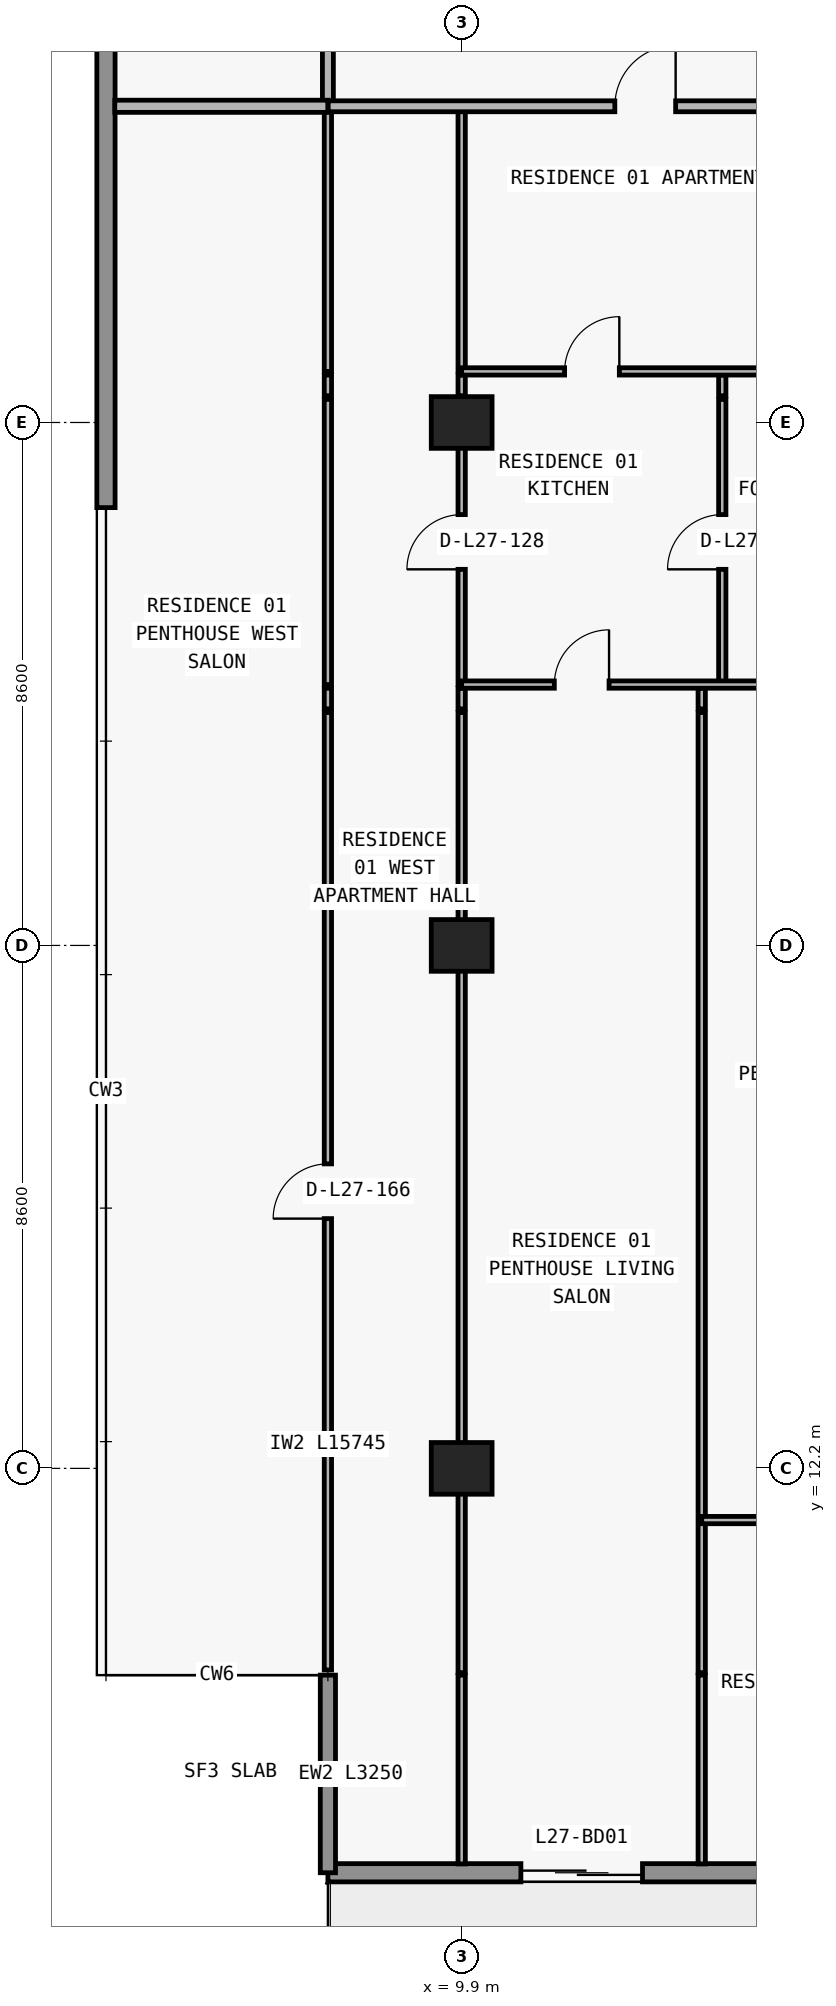
"""IFC4 building model, lengths in metres.
Left out: names, types, materials, properties, quantities, classifications, styles, units other than length and angle.
Written with IfcOpenShell. Run it as: python <this file> out.ifc"""

import sys

from ifc_helpers import new_model, si_unit, direction, frame, frame_2d, origin, origin_2d, place, context, subcontext, project, spatial, rectangle, extrude, element, fill, save


model = new_model("IFC4")
c1 = context("Model", 3, precision=1e-05, world=origin(), true_north=direction((0.0, 1.0)))
c2 = subcontext(c1, "Body", "Model", "MODEL_VIEW")
j1 = project(units=[si_unit("LENGTHUNIT", "METRE"), si_unit("PLANEANGLEUNIT", "RADIAN")], contexts=[c1])
p1 = place(None, origin())
s1 = spatial("IfcSite", under=j1, at=p1, CompositionType="ELEMENT")
p2 = place(p1, origin())
s2 = spatial("IfcBuilding", under=s1, at=p2, CompositionType="ELEMENT")
p3 = place(p2, frame((0.0, 0.0, 102.6)))
s3 = spatial("IfcBuildingStorey", under=s2, at=p3, CompositionType="ELEMENT", Elevation=102.6)
for number, where, z_axis, x_axis in (
    (1, (9.9, 12.2, 0.0), (0.0, 0.0, 1.0), (1.0, 0.0, 0.0)),
    (2, (9.9, 20.8, 0.0), (0.0, 0.0, 1.0), (1.0, 0.0, 0.0)),
    (3, (9.9, 29.4, 0.0), (0.0, 0.0, 1.0), (1.0, 0.0, 0.0)),
):
    element("IfcColumn", number, at=place(p3, frame(where, z_axis=z_axis, x_axis=x_axis)), inside=s3, PredefinedType="COLUMN", context=c2, shape_type="SweptSolid", body=[
        extrude(rectangle(XDim=1.0, YDim=0.85, at=origin_2d()), origin(), (0.0, 0.0, 1.0), 3.05),
    ])
p4 = place(p3, frame((70.1, 5.55, 0.0), z_axis=(0.0, 0.0, 1.0), x_axis=(-1.0, 0.0, 0.0)))
e4 = element("IfcWall", 4, at=p4, inside=s3, PredefinedType="STANDARD", context=c2, shape_type="SweptSolid", body=[
    extrude(rectangle(XDim=62.4, YDim=0.3, at=frame_2d((31.2, 0.0))), origin(), (0.0, 0.0, 1.0), 3.05),
])
p5 = place(p4, frame((57.226, 0.0, 0.0)))
e5 = element("IfcOpeningElement", 5, at=p5, cuts=e4, PredefinedType="OPENING", context=c2, shape_type="SweptSolid", body=[
    extrude(rectangle(XDim=2.0, YDim=2.3, at=frame_2d((1.0, 1.15))), frame((0.0, 0.16, 0.0), z_axis=(0.0, -1.0, 0.0), x_axis=(1.0, 0.0, 0.0)), (0.0, 0.0, 1.0), 0.32),
])
p6 = place(p4, frame((52.926, 0.0, 0.85)))
e6 = element("IfcOpeningElement", 6, at=p6, cuts=e4, PredefinedType="OPENING", context=c2, shape_type="SweptSolid", body=[
    extrude(rectangle(XDim=2.2, YDim=1.55, at=frame_2d((1.1, 0.775))), frame((0.0, 0.16, 0.0), z_axis=(0.0, -1.0, 0.0), x_axis=(1.0, 0.0, 0.0)), (0.0, 0.0, 1.0), 0.32),
])
p7 = place(p4, frame((48.49, 0.0, 0.0)))
e7 = element("IfcOpeningElement", 7, at=p7, cuts=e4, PredefinedType="OPENING", context=c2, shape_type="SweptSolid", body=[
    extrude(rectangle(XDim=2.0, YDim=2.3, at=frame_2d((1.0, 1.15))), frame((0.0, 0.16, 0.0), z_axis=(0.0, -1.0, 0.0), x_axis=(1.0, 0.0, 0.0)), (0.0, 0.0, 1.0), 0.32),
])
p8 = place(p4, frame((44.39, 0.0, 0.85)))
e8 = element("IfcOpeningElement", 8, at=p8, cuts=e4, PredefinedType="OPENING", context=c2, shape_type="SweptSolid", body=[
    extrude(rectangle(XDim=1.8, YDim=1.55, at=frame_2d((0.9, 0.775))), frame((0.0, 0.16, 0.0), z_axis=(0.0, -1.0, 0.0), x_axis=(1.0, 0.0, 0.0)), (0.0, 0.0, 1.0), 0.32),
])
p9 = place(p4, frame((40.49, 0.0, 0.0)))
e9 = element("IfcOpeningElement", 9, at=p9, cuts=e4, PredefinedType="OPENING", context=c2, shape_type="SweptSolid", body=[
    extrude(rectangle(XDim=2.0, YDim=2.3, at=frame_2d((1.0, 1.15))), frame((0.0, 0.16, 0.0), z_axis=(0.0, -1.0, 0.0), x_axis=(1.0, 0.0, 0.0)), (0.0, 0.0, 1.0), 0.32),
])
p10 = place(p4, frame((35.81, 0.0, 0.65)))
e10 = element("IfcOpeningElement", 10, at=p10, cuts=e4, PredefinedType="OPENING", context=c2, shape_type="SweptSolid", body=[
    extrude(rectangle(XDim=2.6, YDim=1.85, at=frame_2d((1.3, 0.925))), frame((0.0, 0.16, 0.0), z_axis=(0.0, -1.0, 0.0), x_axis=(1.0, 0.0, 0.0)), (0.0, 0.0, 1.0), 0.32),
])
p11 = place(p4, frame((30.1, 0.0, 0.85)))
e11 = element("IfcOpeningElement", 11, at=p11, cuts=e4, PredefinedType="OPENING", context=c2, shape_type="SweptSolid", body=[
    extrude(rectangle(XDim=2.2, YDim=1.55, at=frame_2d((1.1, 0.775))), frame((0.0, 0.16, 0.0), z_axis=(0.0, -1.0, 0.0), x_axis=(1.0, 0.0, 0.0)), (0.0, 0.0, 1.0), 0.32),
])
p12 = place(p4, frame((22.1, 0.0, 0.85)))
e12 = element("IfcOpeningElement", 12, at=p12, cuts=e4, PredefinedType="OPENING", context=c2, shape_type="SweptSolid", body=[
    extrude(rectangle(XDim=2.2, YDim=1.55, at=frame_2d((1.1, 0.775))), frame((0.0, 0.16, 0.0), z_axis=(0.0, -1.0, 0.0), x_axis=(1.0, 0.0, 0.0)), (0.0, 0.0, 1.0), 0.32),
])
p13 = place(p4, frame((15.69, 0.0, 0.0)))
e13 = element("IfcOpeningElement", 13, at=p13, cuts=e4, PredefinedType="OPENING", context=c2, shape_type="SweptSolid", body=[
    extrude(rectangle(XDim=2.0, YDim=2.3, at=frame_2d((1.0, 1.15))), frame((0.0, 0.16, 0.0), z_axis=(0.0, -1.0, 0.0), x_axis=(1.0, 0.0, 0.0)), (0.0, 0.0, 1.0), 0.32),
])
p14 = place(p4, frame((11.59, 0.0, 0.85)))
e14 = element("IfcOpeningElement", 14, at=p14, cuts=e4, PredefinedType="OPENING", context=c2, shape_type="SweptSolid", body=[
    extrude(rectangle(XDim=1.8, YDim=1.55, at=frame_2d((0.9, 0.775))), frame((0.0, 0.16, 0.0), z_axis=(0.0, -1.0, 0.0), x_axis=(1.0, 0.0, 0.0)), (0.0, 0.0, 1.0), 0.32),
])
p15 = place(p4, frame((7.626, 0.0, 0.0)))
e15 = element("IfcOpeningElement", 15, at=p15, cuts=e4, PredefinedType="OPENING", context=c2, shape_type="SweptSolid", body=[
    extrude(rectangle(XDim=2.0, YDim=2.3, at=frame_2d((1.0, 1.15))), frame((0.0, 0.16, 0.0), z_axis=(0.0, -1.0, 0.0), x_axis=(1.0, 0.0, 0.0)), (0.0, 0.0, 1.0), 0.32),
])
p16 = place(p4, frame((3.326, 0.0, 0.85)))
e16 = element("IfcOpeningElement", 16, at=p16, cuts=e4, PredefinedType="OPENING", context=c2, shape_type="SweptSolid", body=[
    extrude(rectangle(XDim=2.2, YDim=1.55, at=frame_2d((1.1, 0.775))), frame((0.0, 0.16, 0.0), z_axis=(0.0, -1.0, 0.0), x_axis=(1.0, 0.0, 0.0)), (0.0, 0.0, 1.0), 0.32),
])
p17 = place(p3, frame((7.7, 8.8, 0.0), z_axis=(0.0, 0.0, 1.0), x_axis=(0.0, -1.0, 0.0)))
e17 = element("IfcWall", 17, at=p17, inside=s3, PredefinedType="ELEMENTEDWALL", context=c2, shape_type="SweptSolid", body=[
    extrude(rectangle(XDim=3.25, YDim=0.25, at=frame_2d((1.625, 0.0))), origin(), (0.0, 0.0, 1.0), 3.05),
])
p18 = place(p3, frame((4.05, 28.0, 0.0), z_axis=(0.0, 0.0, 1.0), x_axis=(0.0, 1.0, 0.0)))
e18 = element("IfcWall", 18, at=p18, inside=s3, PredefinedType="STANDARD", context=c2, shape_type="SweptSolid", body=[
    extrude(rectangle(XDim=19.2, YDim=0.3, at=frame_2d((9.6, 0.0))), origin(), (0.0, 0.0, 1.0), 3.05),
])
p19 = place(p3, frame((7.7, 8.885, 0.0), z_axis=(0.0, 0.0, 1.0), x_axis=(0.0, 1.0, 0.0)))
e19 = element("IfcWall", 19, at=p19, inside=s3, PredefinedType="PARTITIONING", context=c2, shape_type="SweptSolid", body=[
    extrude(rectangle(XDim=15.745, YDim=0.12, at=frame_2d((7.873, 0.0))), origin(), (0.0, 0.0, 1.0), 3.05),
])
p20 = place(p19, frame((7.423, 0.0, 0.0)))
e20 = element("IfcOpeningElement", 20, at=p20, cuts=e19, PredefinedType="OPENING", context=c2, shape_type="SweptSolid", body=[
    extrude(rectangle(XDim=0.9, YDim=2.15, at=frame_2d((0.45, 1.075))), frame((0.0, 0.07, 0.0), z_axis=(0.0, -1.0, 0.0), x_axis=(1.0, 0.0, 0.0)), (0.0, 0.0, 1.0), 0.14),
])
p21 = place(p3, frame((7.7, 24.69, 0.0), z_axis=(0.0, 0.0, 1.0), x_axis=(0.0, 1.0, 0.0)))
e21 = element("IfcWall", 21, at=p21, inside=s3, PredefinedType="PARTITIONING", context=c2, shape_type="SweptSolid", body=[
    extrude(rectangle(XDim=0.34, YDim=0.12, at=frame_2d((0.17, 0.0))), origin(), (0.0, 0.0, 1.0), 3.05),
])
p22 = place(p3, frame((7.7, 25.09, 0.0), z_axis=(0.0, 0.0, 1.0), x_axis=(0.0, 1.0, 0.0)))
e22 = element("IfcWall", 22, at=p22, inside=s3, PredefinedType="PARTITIONING", context=c2, shape_type="SweptSolid", body=[
    extrude(rectangle(XDim=4.69, YDim=0.12, at=frame_2d((2.345, 0.0))), origin(), (0.0, 0.0, 1.0), 3.05),
])
p23 = place(p3, frame((7.7, 29.84, 0.0), z_axis=(0.0, 0.0, 1.0), x_axis=(0.0, 1.0, 0.0)))
e23 = element("IfcWall", 23, at=p23, inside=s3, PredefinedType="PARTITIONING", context=c2, shape_type="SweptSolid", body=[
    extrude(rectangle(XDim=0.34, YDim=0.12, at=frame_2d((0.17, 0.0))), origin(), (0.0, 0.0, 1.0), 3.05),
])
p24 = place(p3, frame((7.7, 30.24, 0.0), z_axis=(0.0, 0.0, 1.0), x_axis=(0.0, 1.0, 0.0)))
e24 = element("IfcWall", 24, at=p24, inside=s3, PredefinedType="PARTITIONING", context=c2, shape_type="SweptSolid", body=[
    extrude(rectangle(XDim=4.36, YDim=0.12, at=frame_2d((2.18, 0.0))), origin(), (0.0, 0.0, 1.0), 3.05),
])
p25 = place(p3, frame((7.7, 34.605, 0.0), z_axis=(0.0, 0.0, 1.0), x_axis=(0.0, 1.0, 0.0)))
e25 = element("IfcWall", 25, at=p25, inside=s3, PredefinedType="PARTITIONING", context=c2, shape_type="SweptSolid", body=[
    extrude(rectangle(XDim=2.345, YDim=0.18, at=frame_2d((1.172, 0.0))), origin(), (0.0, 0.0, 1.0), 3.05),
])
p26 = place(p3, frame((9.9, 5.695, 0.0), z_axis=(0.0, 0.0, 1.0), x_axis=(0.0, 1.0, 0.0)))
e26 = element("IfcWall", 26, at=p26, inside=s3, PredefinedType="PARTITIONING", context=c2, shape_type="SweptSolid", body=[
    extrude(rectangle(XDim=3.105, YDim=0.12, at=frame_2d((1.552, 0.0))), origin(), (0.0, 0.0, 1.0), 3.05),
])
p27 = place(p3, frame((9.9, 8.84, 0.0), z_axis=(0.0, 0.0, 1.0), x_axis=(0.0, 1.0, 0.0)))
e27 = element("IfcWall", 27, at=p27, inside=s3, PredefinedType="PARTITIONING", context=c2, shape_type="SweptSolid", body=[
    extrude(rectangle(XDim=15.79, YDim=0.12, at=frame_2d((7.895, 0.0))), origin(), (0.0, 0.0, 1.0), 2.174),
])
p28 = place(p3, frame((9.9, 24.69, 0.0), z_axis=(0.0, 0.0, 1.0), x_axis=(0.0, 1.0, 0.0)))
e28 = element("IfcWall", 28, at=p28, inside=s3, PredefinedType="PARTITIONING", context=c2, shape_type="SweptSolid", body=[
    extrude(rectangle(XDim=0.34, YDim=0.12, at=frame_2d((0.17, 0.0))), origin(), (0.0, 0.0, 1.0), 2.174),
])
p29 = place(p3, frame((9.9, 25.09, 0.0), z_axis=(0.0, 0.0, 1.0), x_axis=(0.0, 1.0, 0.0)))
e29 = element("IfcWall", 29, at=p29, inside=s3, PredefinedType="PARTITIONING", context=c2, shape_type="SweptSolid", body=[
    extrude(rectangle(XDim=4.69, YDim=0.12, at=frame_2d((2.345, 0.0))), origin(), (0.0, 0.0, 1.0), 2.174),
])
p30 = place(p29, frame((1.895, 0.0, 0.0)))
e30 = element("IfcOpeningElement", 30, at=p30, cuts=e29, PredefinedType="OPENING", context=c2, shape_type="SweptSolid", body=[
    extrude(rectangle(XDim=0.9, YDim=2.124, at=frame_2d((0.45, 1.062))), frame((0.0, 0.07, 0.0), z_axis=(0.0, -1.0, 0.0), x_axis=(1.0, 0.0, 0.0)), (0.0, 0.0, 1.0), 0.14),
])
p31 = place(p3, frame((9.9, 29.84, 0.0), z_axis=(0.0, 0.0, 1.0), x_axis=(0.0, 1.0, 0.0)))
e31 = element("IfcWall", 31, at=p31, inside=s3, PredefinedType="PARTITIONING", context=c2, shape_type="SweptSolid", body=[
    extrude(rectangle(XDim=0.34, YDim=0.12, at=frame_2d((0.17, 0.0))), origin(), (0.0, 0.0, 1.0), 2.174),
])
p32 = place(p3, frame((9.9, 30.24, 0.0), z_axis=(0.0, 0.0, 1.0), x_axis=(0.0, 1.0, 0.0)))
e32 = element("IfcWall", 32, at=p32, inside=s3, PredefinedType="PARTITIONING", context=c2, shape_type="SweptSolid", body=[
    extrude(rectangle(XDim=4.36, YDim=0.12, at=frame_2d((2.18, 0.0))), origin(), (0.0, 0.0, 1.0), 2.174),
])
p33 = place(p3, frame((13.848, 5.695, 0.0), z_axis=(0.0, 0.0, 1.0), x_axis=(0.0, 1.0, 0.0)))
e33 = element("IfcWall", 33, at=p33, inside=s3, PredefinedType="PARTITIONING", context=c2, shape_type="SweptSolid", body=[
    extrude(rectangle(XDim=3.105, YDim=0.12, at=frame_2d((1.552, 0.0))), origin(), (0.0, 0.0, 1.0), 3.05),
])
p34 = place(p3, frame((13.848, 8.84, 0.0), z_axis=(0.0, 0.0, 1.0), x_axis=(0.0, 1.0, 0.0)))
e34 = element("IfcWall", 34, at=p34, inside=s3, PredefinedType="PARTITIONING", context=c2, shape_type="SweptSolid", body=[
    extrude(rectangle(XDim=15.79, YDim=0.12, at=frame_2d((7.895, 0.0))), origin(), (0.0, 0.0, 1.0), 3.05),
])
p35 = place(p3, frame((13.848, 24.69, 0.0), z_axis=(0.0, 0.0, 1.0), x_axis=(0.0, 1.0, 0.0)))
e35 = element("IfcWall", 35, at=p35, inside=s3, PredefinedType="PARTITIONING", context=c2, shape_type="SweptSolid", body=[
    extrude(rectangle(XDim=0.34, YDim=0.12, at=frame_2d((0.17, 0.0))), origin(), (0.0, 0.0, 1.0), 3.05),
])
p36 = place(p3, frame((14.186, 25.09, 0.0), z_axis=(0.0, 0.0, 1.0), x_axis=(0.0, 1.0, 0.0)))
e36 = element("IfcWall", 36, at=p36, inside=s3, PredefinedType="PARTITIONING", context=c2, shape_type="SweptSolid", body=[
    extrude(rectangle(XDim=4.69, YDim=0.12, at=frame_2d((2.345, 0.0))), origin(), (0.0, 0.0, 1.0), 3.05),
])
p37 = place(p36, frame((1.895, 0.0, 0.0)))
e37 = element("IfcOpeningElement", 37, at=p37, cuts=e36, PredefinedType="OPENING", context=c2, shape_type="SweptSolid", body=[
    extrude(rectangle(XDim=0.9, YDim=2.15, at=frame_2d((0.45, 1.075))), frame((0.0, 0.07, 0.0), z_axis=(0.0, -1.0, 0.0), x_axis=(1.0, 0.0, 0.0)), (0.0, 0.0, 1.0), 0.14),
])
p38 = place(p3, frame((14.186, 29.84, 0.0), z_axis=(0.0, 0.0, 1.0), x_axis=(0.0, 1.0, 0.0)))
e38 = element("IfcWall", 38, at=p38, inside=s3, PredefinedType="PARTITIONING", context=c2, shape_type="SweptSolid", body=[
    extrude(rectangle(XDim=0.34, YDim=0.12, at=frame_2d((0.17, 0.0))), origin(), (0.0, 0.0, 1.0), 3.05),
])
p39 = place(p3, frame((13.848, 11.35, 0.0), z_axis=(0.0, 0.0, 1.0), x_axis=(1.0, 0.0, 0.0)))
e39 = element("IfcWall", 39, at=p39, inside=s3, PredefinedType="PARTITIONING", context=c2, shape_type="SweptSolid", body=[
    extrude(rectangle(XDim=4.402, YDim=0.12, at=frame_2d((2.201, 0.0))), origin(), (0.0, 0.0, 1.0), 3.05),
])
p40 = place(p39, frame((1.751, 0.0, 0.0)))
e40 = element("IfcOpeningElement", 40, at=p40, cuts=e39, PredefinedType="OPENING", context=c2, shape_type="SweptSolid", body=[
    extrude(rectangle(XDim=0.9, YDim=2.15, at=frame_2d((0.45, 1.075))), frame((0.0, 0.07, 0.0), z_axis=(0.0, -1.0, 0.0), x_axis=(1.0, 0.0, 0.0)), (0.0, 0.0, 1.0), 0.14),
])
p41 = place(p3, frame((9.9, 25.09, 0.0), z_axis=(0.0, 0.0, 1.0), x_axis=(1.0, 0.0, 0.0)))
e41 = element("IfcWall", 41, at=p41, inside=s3, PredefinedType="PARTITIONING", context=c2, shape_type="SweptSolid", body=[
    extrude(rectangle(XDim=8.35, YDim=0.12, at=frame_2d((4.175, 0.0))), origin(), (0.0, 0.0, 1.0), 3.05),
])
p42 = place(p41, frame((1.524, 0.0, 0.0)))
e42 = element("IfcOpeningElement", 42, at=p42, cuts=e41, PredefinedType="OPENING", context=c2, shape_type="SweptSolid", body=[
    extrude(rectangle(XDim=0.9, YDim=2.15, at=frame_2d((0.45, 1.075))), frame((0.0, 0.07, 0.0), z_axis=(0.0, -1.0, 0.0), x_axis=(1.0, 0.0, 0.0)), (0.0, 0.0, 1.0), 0.14),
])
p43 = place(p41, frame((5.868, 0.0, 0.0)))
e43 = element("IfcOpeningElement", 43, at=p43, cuts=e41, PredefinedType="OPENING", context=c2, shape_type="SweptSolid", body=[
    extrude(rectangle(XDim=0.9, YDim=2.15, at=frame_2d((0.45, 1.075))), frame((0.0, 0.07, 0.0), z_axis=(0.0, -1.0, 0.0), x_axis=(1.0, 0.0, 0.0)), (0.0, 0.0, 1.0), 0.14),
])
p44 = place(p3, frame((9.9, 30.24, 0.0), z_axis=(0.0, 0.0, 1.0), x_axis=(1.0, 0.0, 0.0)))
e44 = element("IfcWall", 44, at=p44, inside=s3, PredefinedType="PARTITIONING", context=c2, shape_type="SweptSolid", body=[
    extrude(rectangle(XDim=8.35, YDim=0.12, at=frame_2d((4.175, 0.0))), origin(), (0.0, 0.0, 1.0), 3.05),
])
p45 = place(p44, frame((1.693, 0.0, 0.0)))
e45 = element("IfcOpeningElement", 45, at=p45, cuts=e44, PredefinedType="OPENING", context=c2, shape_type="SweptSolid", body=[
    extrude(rectangle(XDim=0.9, YDim=2.15, at=frame_2d((0.45, 1.075))), frame((0.0, 0.07, 0.0), z_axis=(0.0, -1.0, 0.0), x_axis=(1.0, 0.0, 0.0)), (0.0, 0.0, 1.0), 0.14),
])
p46 = place(p3, frame((4.195, 34.6, 0.0), z_axis=(0.0, 0.0, 1.0), x_axis=(1.0, 0.0, 0.0)))
e46 = element("IfcWall", 46, at=p46, inside=s3, PredefinedType="PARTITIONING", context=c2, shape_type="SweptSolid", body=[
    extrude(rectangle(XDim=3.505, YDim=0.2, at=frame_2d((1.752, 0.0))), origin(), (0.0, 0.0, 1.0), 3.05),
])
p47 = place(p3, frame((7.705, 34.6, 0.0), z_axis=(0.0, 0.0, 1.0), x_axis=(1.0, 0.0, 0.0)))
e47 = element("IfcWall", 47, at=p47, inside=s3, PredefinedType="PARTITIONING", context=c2, shape_type="SweptSolid", body=[
    extrude(rectangle(XDim=10.545, YDim=0.18, at=frame_2d((5.272, 0.0))), origin(), (0.0, 0.0, 1.0), 3.05),
])
p48 = place(p47, frame((4.714, 0.0, 0.0)))
e48 = element("IfcOpeningElement", 48, at=p48, cuts=e47, PredefinedType="OPENING", context=c2, shape_type="SweptSolid", body=[
    extrude(rectangle(XDim=1.0, YDim=2.2, at=frame_2d((0.5, 1.1))), frame((0.0, 0.1, 0.0), z_axis=(0.0, -1.0, 0.0), x_axis=(1.0, 0.0, 0.0)), (0.0, 0.0, 1.0), 0.2),
])
p49 = place(p5, origin())
e49 = element("IfcDoor", 49, at=p49, inside=s3, OperationType="DOUBLE_DOOR_SLIDING", PredefinedType="DOOR", context=c2, shape_type="SweptSolid", body=[
    extrude(rectangle(XDim=2.0, YDim=2.3, at=frame_2d((1.0, 1.15))), frame((0.0, 0.025, 0.0), z_axis=(0.0, -1.0, 0.0), x_axis=(1.0, 0.0, 0.0)), (0.0, 0.0, 1.0), 0.05),
])
fill(e5, e49)
p50 = place(p48, origin())
e50 = element("IfcDoor", 50, at=p50, inside=s3, OperationType="SINGLE_SWING_RIGHT", PredefinedType="DOOR", context=c2, shape_type="SweptSolid", body=[
    extrude(rectangle(XDim=1.0, YDim=2.2, at=frame_2d((0.5, 1.1))), frame((0.0, 0.025, 0.0), z_axis=(0.0, -1.0, 0.0), x_axis=(1.0, 0.0, 0.0)), (0.0, 0.0, 1.0), 0.05),
])
fill(e48, e50)
p51 = place(p45, origin())
e51 = element("IfcDoor", 51, at=p51, inside=s3, OperationType="SINGLE_SWING_RIGHT", PredefinedType="DOOR", context=c2, shape_type="SweptSolid", body=[
    extrude(rectangle(XDim=0.9, YDim=2.15, at=frame_2d((0.45, 1.075))), frame((0.0, 0.025, 0.0), z_axis=(0.0, -1.0, 0.0), x_axis=(1.0, 0.0, 0.0)), (0.0, 0.0, 1.0), 0.05),
])
fill(e45, e51)
p52 = place(p37, origin())
e52 = element("IfcDoor", 52, at=p52, inside=s3, OperationType="SINGLE_SWING_LEFT", PredefinedType="DOOR", context=c2, shape_type="SweptSolid", body=[
    extrude(rectangle(XDim=0.9, YDim=2.15, at=frame_2d((0.45, 1.075))), frame((0.0, 0.025, 0.0), z_axis=(0.0, -1.0, 0.0), x_axis=(1.0, 0.0, 0.0)), (0.0, 0.0, 1.0), 0.05),
])
fill(e37, e52)
p53 = place(p42, origin())
e53 = element("IfcDoor", 53, at=p53, inside=s3, OperationType="SINGLE_SWING_RIGHT", PredefinedType="DOOR", context=c2, shape_type="SweptSolid", body=[
    extrude(rectangle(XDim=0.9, YDim=2.15, at=frame_2d((0.45, 1.075))), frame((0.0, 0.025, 0.0), z_axis=(0.0, -1.0, 0.0), x_axis=(1.0, 0.0, 0.0)), (0.0, 0.0, 1.0), 0.05),
])
fill(e42, e53)
p54 = place(p30, origin())
e54 = element("IfcDoor", 54, at=p54, inside=s3, OperationType="SINGLE_SWING_LEFT", PredefinedType="DOOR", context=c2, shape_type="SweptSolid", body=[
    extrude(rectangle(XDim=0.9, YDim=2.124, at=frame_2d((0.45, 1.062))), frame((0.0, 0.025, 0.0), z_axis=(0.0, -1.0, 0.0), x_axis=(1.0, 0.0, 0.0)), (0.0, 0.0, 1.0), 0.05),
])
fill(e30, e54)
p55 = place(p20, origin())
e55 = element("IfcDoor", 55, at=p55, inside=s3, OperationType="SINGLE_SWING_LEFT", PredefinedType="DOOR", context=c2, shape_type="SweptSolid", body=[
    extrude(rectangle(XDim=0.9, YDim=2.15, at=frame_2d((0.45, 1.075))), frame((0.0, 0.025, 0.0), z_axis=(0.0, -1.0, 0.0), x_axis=(1.0, 0.0, 0.0)), (0.0, 0.0, 1.0), 0.05),
])
fill(e20, e55)
save(model, sys.argv[1])
